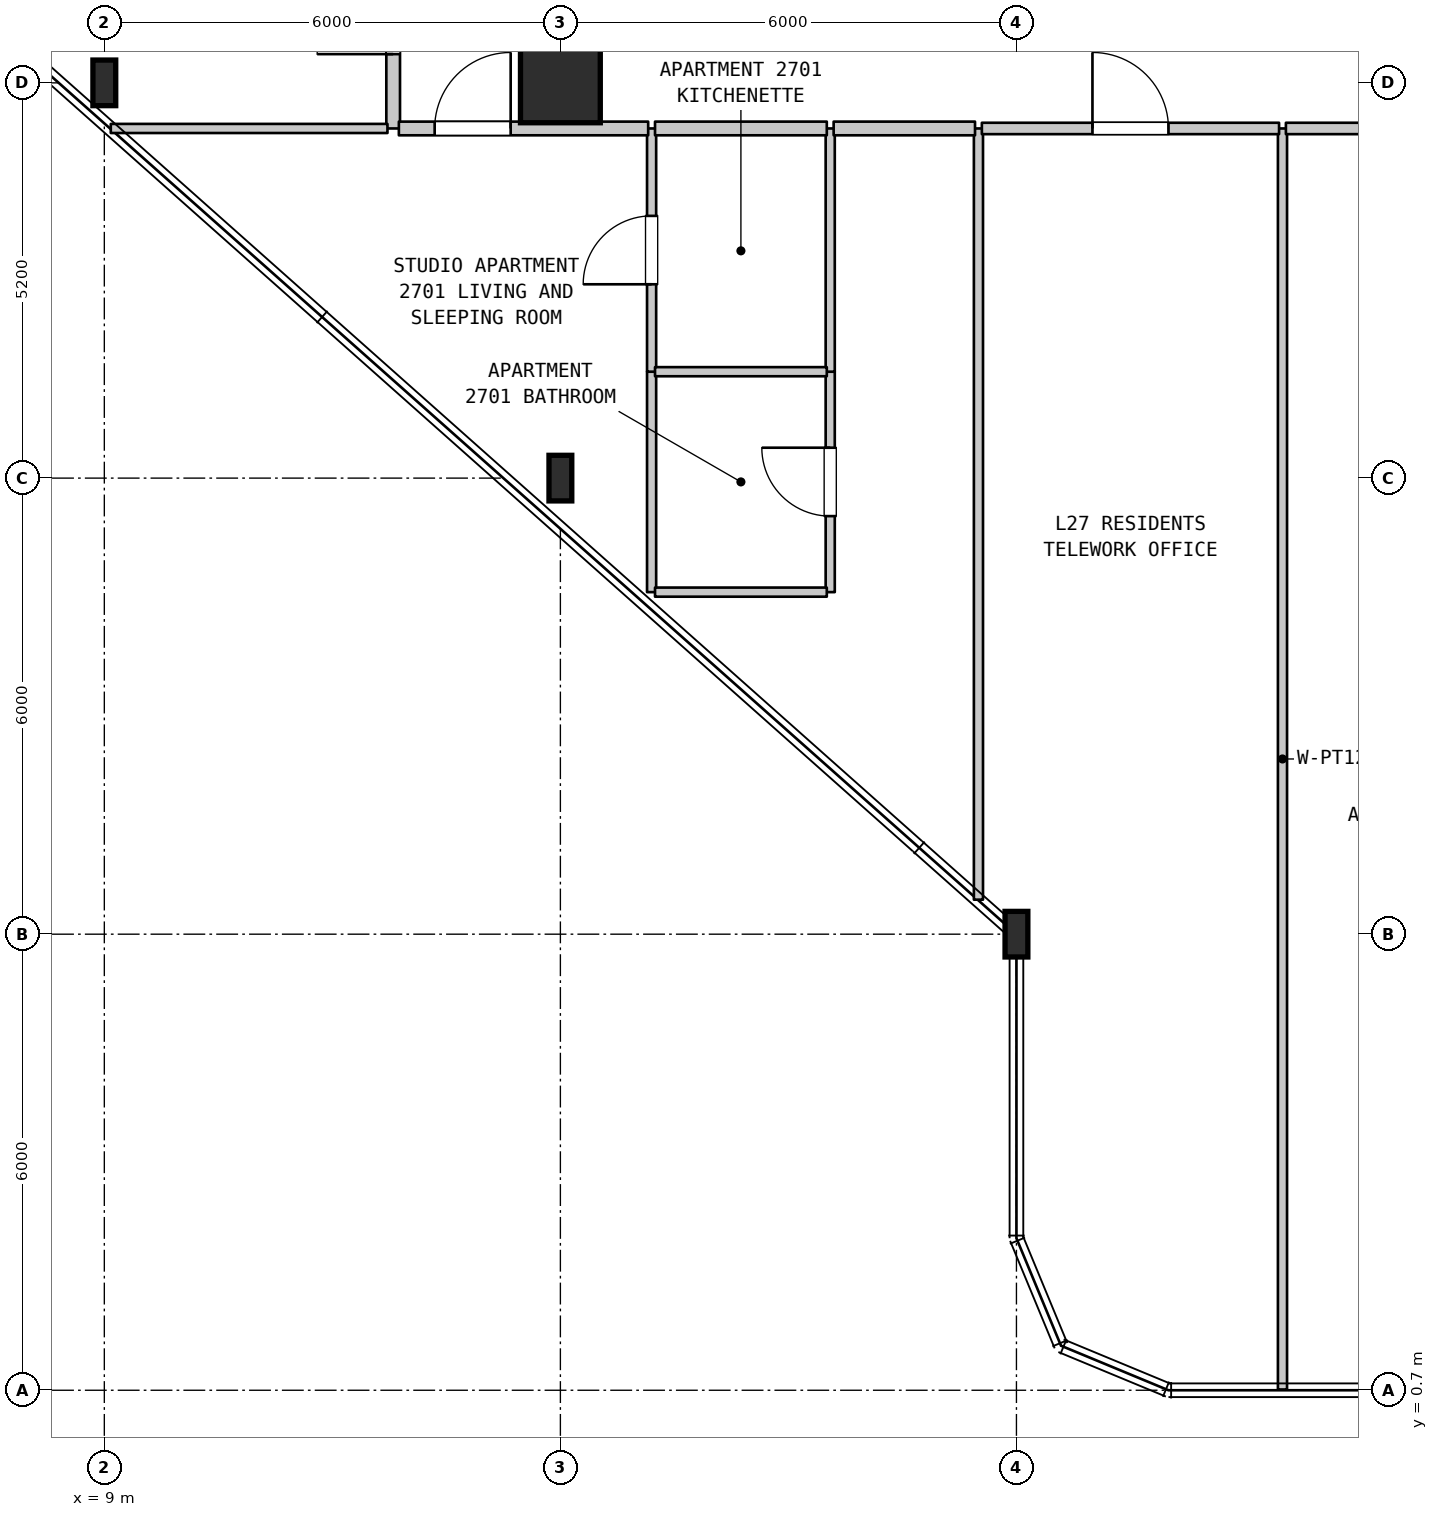
"""IFC4 building model, lengths in metres.
Left out: names, types, materials, properties, quantities, classifications, styles, units other than length and angle.
Written with IfcOpenShell. Run it as: python <this file> out.ifc"""

import sys

from ifc_helpers import new_model, si_unit, direction, frame, frame_2d, origin, origin_2d, place, context, subcontext, project, spatial, rectangle, i_section, extrude, element, fill, save


model = new_model("IFC4")
c1 = context("Model", 3, precision=1e-05, world=origin(), true_north=direction((0.0, 1.0)))
c2 = subcontext(c1, "Body", "Model", "MODEL_VIEW")
j1 = project(units=[si_unit("LENGTHUNIT", "METRE"), si_unit("PLANEANGLEUNIT", "RADIAN")], contexts=[c1])
p1 = place(None, origin())
s1 = spatial("IfcSite", under=j1, at=p1, CompositionType="ELEMENT")
p2 = place(p1, origin())
s2 = spatial("IfcBuilding", under=s1, at=p2, CompositionType="ELEMENT")
p3 = place(p2, frame((0.0, 0.0, 113.1)))
s3 = spatial("IfcBuildingStorey", under=s2, at=p3, CompositionType="ELEMENT", Elevation=113.1)
for number, where, z_axis, x_axis in (
    (1, (9.0, 17.9, 0.0), (0.0, 0.0, 1.0), (1.0, 0.0, 0.0)),
    (2, (15.0, 12.7, 0.0), (0.0, 0.0, 1.0), (1.0, 0.0, 0.0)),
):
    element("IfcColumn", number, at=place(p3, frame(where, z_axis=z_axis, x_axis=x_axis)), inside=s3, PredefinedType="COLUMN", context=c2, shape_type="SweptSolid", body=[
        extrude(i_section(OverallWidth=0.3, OverallDepth=0.6, WebThickness=0.015, FlangeThickness=0.03, FilletRadius=0.027, at=origin_2d()), origin(), (0.0, 0.0, 1.0), 3.7),
    ])
p4 = place(p3, frame((15.0, 17.9, 0.0), z_axis=(0.0, 0.0, 1.0), x_axis=(1.0, 0.0, 0.0)))
e3 = element("IfcColumn", 3, at=p4, inside=s3, PredefinedType="COLUMN", context=c2, shape_type="SweptSolid", body=[
    extrude(rectangle(XDim=1.05, YDim=1.05, at=origin_2d()), origin(), (0.0, 0.0, 1.0), 3.7),
])
p5 = place(p3, frame((21.0, 6.7, 0.0), z_axis=(0.0, 0.0, 1.0), x_axis=(1.0, 0.0, 0.0)))
e4 = element("IfcColumn", 4, at=p5, inside=s3, PredefinedType="COLUMN", context=c2, shape_type="SweptSolid", body=[
    extrude(i_section(OverallWidth=0.3, OverallDepth=0.6, WebThickness=0.015, FlangeThickness=0.03, FilletRadius=0.027, at=origin_2d()), origin(), (0.0, 0.0, 1.0), 3.7),
])
p6 = place(p3, frame((12.8, 17.3, 0.0), z_axis=(0.0, 0.0, 1.0), x_axis=(0.0, 1.0, 0.0)))
e5 = element("IfcWall", 5, at=p6, inside=s3, PredefinedType="STANDARD", context=c2, shape_type="SweptSolid", body=[
    extrude(rectangle(XDim=3.1, YDim=0.18, at=frame_2d((1.55, 0.0))), origin(), (0.0, 0.0, 1.0), 3.385),
])
p7 = place(p6, frame((0.978, 0.0, 0.0)))
e6 = element("IfcOpeningElement", 6, at=p7, cuts=e5, PredefinedType="OPENING", context=c2, shape_type="SweptSolid", body=[
    extrude(rectangle(XDim=1.0, YDim=2.15, at=frame_2d((0.5, 1.075))), frame((0.0, 0.1, 0.0), z_axis=(0.0, -1.0, 0.0), x_axis=(1.0, 0.0, 0.0)), (0.0, 0.0, 1.0), 0.2),
])
p8 = place(p3, frame((16.2, 11.2, 0.0), z_axis=(0.0, 0.0, 1.0), x_axis=(0.0, 1.0, 0.0)))
e7 = element("IfcWall", 7, at=p8, inside=s3, PredefinedType="PARTITIONING", context=c2, shape_type="SweptSolid", body=[
    extrude(rectangle(XDim=2.9, YDim=0.12, at=frame_2d((1.45, 0.0))), origin(), (0.0, 0.0, 1.0), 3.385),
])
p9 = place(p3, frame((16.2, 14.1, 0.0), z_axis=(0.0, 0.0, 1.0), x_axis=(0.0, 1.0, 0.0)))
e8 = element("IfcWall", 8, at=p9, inside=s3, PredefinedType="PARTITIONING", context=c2, shape_type="SweptSolid", body=[
    extrude(rectangle(XDim=3.2, YDim=0.12, at=frame_2d((1.6, 0.0))), origin(), (0.0, 0.0, 1.0), 3.385),
])
p10 = place(p9, frame((1.15, 0.0, 0.0)))
e9 = element("IfcOpeningElement", 9, at=p10, cuts=e8, PredefinedType="OPENING", context=c2, shape_type="SweptSolid", body=[
    extrude(rectangle(XDim=0.9, YDim=2.15, at=frame_2d((0.45, 1.075))), frame((0.0, 0.07, 0.0), z_axis=(0.0, -1.0, 0.0), x_axis=(1.0, 0.0, 0.0)), (0.0, 0.0, 1.0), 0.14),
])
p11 = place(p3, frame((18.55, 11.2, 0.0), z_axis=(0.0, 0.0, 1.0), x_axis=(0.0, 1.0, 0.0)))
e10 = element("IfcWall", 10, at=p11, inside=s3, PredefinedType="PARTITIONING", context=c2, shape_type="SweptSolid", body=[
    extrude(rectangle(XDim=2.9, YDim=0.12, at=frame_2d((1.45, 0.0))), origin(), (0.0, 0.0, 1.0), 3.385),
])
p12 = place(p11, frame((1.0, 0.0, 0.0)))
e11 = element("IfcOpeningElement", 11, at=p12, cuts=e10, PredefinedType="OPENING", context=c2, shape_type="SweptSolid", body=[
    extrude(rectangle(XDim=0.9, YDim=2.1, at=frame_2d((0.45, 1.05))), frame((0.0, 0.07, 0.0), z_axis=(0.0, -1.0, 0.0), x_axis=(1.0, 0.0, 0.0)), (0.0, 0.0, 1.0), 0.14),
])
p13 = place(p3, frame((18.55, 14.1, 0.0), z_axis=(0.0, 0.0, 1.0), x_axis=(0.0, 1.0, 0.0)))
e12 = element("IfcWall", 12, at=p13, inside=s3, PredefinedType="PARTITIONING", context=c2, shape_type="SweptSolid", body=[
    extrude(rectangle(XDim=3.2, YDim=0.12, at=frame_2d((1.6, 0.0))), origin(), (0.0, 0.0, 1.0), 3.385),
])
p14 = place(p3, frame((20.5, 7.154, 0.0), z_axis=(0.0, 0.0, 1.0), x_axis=(0.0, 1.0, 0.0)))
e13 = element("IfcWall", 13, at=p14, inside=s3, PredefinedType="PARTITIONING", context=c2, shape_type="SweptSolid", body=[
    extrude(rectangle(XDim=10.146, YDim=0.12, at=frame_2d((5.073, 0.0))), origin(), (0.0, 0.0, 1.0), 3.385),
])
p15 = place(p3, frame((24.5, 0.71, 0.0), z_axis=(0.0, 0.0, 1.0), x_axis=(0.0, 1.0, 0.0)))
e14 = element("IfcWall", 14, at=p15, inside=s3, PredefinedType="PARTITIONING", context=c2, shape_type="SweptSolid", body=[
    extrude(rectangle(XDim=16.59, YDim=0.12, at=frame_2d((8.295, 0.0))), origin(), (0.0, 0.0, 1.0), 3.385),
])
for number, where, z_axis, x_axis in (
    (15, (16.245, 11.2, 0.0), (0.0, 0.0, 1.0), (1.0, 0.0, 0.0)),
    (16, (16.245, 14.1, 0.0), (0.0, 0.0, 1.0), (1.0, 0.0, 0.0)),
):
    element("IfcWall", number, at=place(p3, frame(where, z_axis=z_axis, x_axis=x_axis)), inside=s3, PredefinedType="PARTITIONING", context=c2, shape_type="SweptSolid", body=[
        extrude(rectangle(XDim=2.26, YDim=0.12, at=frame_2d((1.13, 0.0))), origin(), (0.0, 0.0, 1.0), 3.385),
    ])
p16 = place(p3, frame((9.085, 17.3, 0.0), z_axis=(0.0, 0.0, 1.0), x_axis=(1.0, 0.0, 0.0)))
e17 = element("IfcWall", 17, at=p16, inside=s3, PredefinedType="PARTITIONING", context=c2, shape_type="SweptSolid", body=[
    extrude(rectangle(XDim=3.64, YDim=0.12, at=frame_2d((1.82, 0.0))), origin(), (0.0, 0.0, 1.0), 3.385),
])
p17 = place(p3, frame((12.875, 17.3, 0.0), z_axis=(0.0, 0.0, 1.0), x_axis=(1.0, 0.0, 0.0)))
e18 = element("IfcWall", 18, at=p17, inside=s3, PredefinedType="STANDARD", context=c2, shape_type="SweptSolid", body=[
    extrude(rectangle(XDim=3.28, YDim=0.18, at=frame_2d((1.64, 0.0))), origin(), (0.0, 0.0, 1.0), 3.385),
])
p18 = place(p17, frame((0.471, 0.0, 0.0)))
e19 = element("IfcOpeningElement", 19, at=p18, cuts=e18, PredefinedType="OPENING", context=c2, shape_type="SweptSolid", body=[
    extrude(rectangle(XDim=1.0, YDim=2.15, at=frame_2d((0.5, 1.075))), frame((0.0, 0.1, 0.0), z_axis=(0.0, -1.0, 0.0), x_axis=(1.0, 0.0, 0.0)), (0.0, 0.0, 1.0), 0.2),
])
p19 = place(p3, frame((16.245, 17.3, 0.0), z_axis=(0.0, 0.0, 1.0), x_axis=(1.0, 0.0, 0.0)))
e20 = element("IfcWall", 20, at=p19, inside=s3, PredefinedType="STANDARD", context=c2, shape_type="SweptSolid", body=[
    extrude(rectangle(XDim=2.26, YDim=0.18, at=frame_2d((1.13, 0.0))), origin(), (0.0, 0.0, 1.0), 3.385),
])
p20 = place(p3, frame((18.595, 17.3, 0.0), z_axis=(0.0, 0.0, 1.0), x_axis=(1.0, 0.0, 0.0)))
e21 = element("IfcWall", 21, at=p20, inside=s3, PredefinedType="STANDARD", context=c2, shape_type="SweptSolid", body=[
    extrude(rectangle(XDim=1.86, YDim=0.18, at=frame_2d((0.93, 0.0))), origin(), (0.0, 0.0, 1.0), 3.385),
])
p21 = place(p3, frame((20.545, 17.3, 0.0), z_axis=(0.0, 0.0, 1.0), x_axis=(1.0, 0.0, 0.0)))
e22 = element("IfcWall", 22, at=p21, inside=s3, PredefinedType="STANDARD", context=c2, shape_type="SweptSolid", body=[
    extrude(rectangle(XDim=3.91, YDim=0.15, at=frame_2d((1.955, 0.0))), origin(), (0.0, 0.0, 1.0), 3.385),
])
p22 = place(p21, frame((1.455, 0.0, 0.0)))
e23 = element("IfcOpeningElement", 23, at=p22, cuts=e22, PredefinedType="OPENING", context=c2, shape_type="SweptSolid", body=[
    extrude(rectangle(XDim=1.0, YDim=2.15, at=frame_2d((0.5, 1.075))), frame((0.0, 0.085, 0.0), z_axis=(0.0, -1.0, 0.0), x_axis=(1.0, 0.0, 0.0)), (0.0, 0.0, 1.0), 0.17),
])
p23 = place(p3, frame((24.545, 17.3, 0.0), z_axis=(0.0, 0.0, 1.0), x_axis=(1.0, 0.0, 0.0)))
e24 = element("IfcWall", 24, at=p23, inside=s3, PredefinedType="STANDARD", context=c2, shape_type="SweptSolid", body=[
    extrude(rectangle(XDim=4.21, YDim=0.15, at=frame_2d((2.105, 0.0))), origin(), (0.0, 0.0, 1.0), 3.385),
])
p24 = place(p23, frame((1.605, 0.0, 0.0)))
e25 = element("IfcOpeningElement", 25, at=p24, cuts=e24, PredefinedType="OPENING", context=c2, shape_type="SweptSolid", body=[
    extrude(rectangle(XDim=1.0, YDim=2.15, at=frame_2d((0.5, 1.075))), frame((0.0, 0.085, 0.0), z_axis=(0.0, -1.0, 0.0), x_axis=(1.0, 0.0, 0.0)), (0.0, 0.0, 1.0), 0.17),
])
p25 = place(p7, origin())
e26 = element("IfcDoor", 26, at=p25, inside=s3, OperationType="SINGLE_SWING_LEFT", PredefinedType="DOOR", context=c2, shape_type="SweptSolid", body=[
    extrude(rectangle(XDim=1.0, YDim=2.15, at=frame_2d((0.5, 1.075))), frame((0.0, 0.025, 0.0), z_axis=(0.0, -1.0, 0.0), x_axis=(1.0, 0.0, 0.0)), (0.0, 0.0, 1.0), 0.05),
])
fill(e6, e26)
p26 = place(p10, origin())
e27 = element("IfcDoor", 27, at=p26, inside=s3, OperationType="SINGLE_SWING_LEFT", PredefinedType="DOOR", context=c2, shape_type="SweptSolid", body=[
    extrude(rectangle(XDim=0.9, YDim=2.15, at=frame_2d((0.45, 1.075))), frame((0.0, 0.025, 0.0), z_axis=(0.0, -1.0, 0.0), x_axis=(1.0, 0.0, 0.0)), (0.0, 0.0, 1.0), 0.05),
])
fill(e9, e27)
p27 = place(p12, origin())
e28 = element("IfcDoor", 28, at=p27, inside=s3, OperationType="SINGLE_SWING_RIGHT", PredefinedType="DOOR", context=c2, shape_type="SweptSolid", body=[
    extrude(rectangle(XDim=0.9, YDim=2.1, at=frame_2d((0.45, 1.05))), frame((0.0, 0.025, 0.0), z_axis=(0.0, -1.0, 0.0), x_axis=(1.0, 0.0, 0.0)), (0.0, 0.0, 1.0), 0.05),
])
fill(e11, e28)
p28 = place(p18, origin())
e29 = element("IfcDoor", 29, at=p28, inside=s3, OperationType="SINGLE_SWING_RIGHT", PredefinedType="DOOR", context=c2, shape_type="SweptSolid", body=[
    extrude(rectangle(XDim=1.0, YDim=2.15, at=frame_2d((0.5, 1.075))), frame((0.0, 0.025, 0.0), z_axis=(0.0, -1.0, 0.0), x_axis=(1.0, 0.0, 0.0)), (0.0, 0.0, 1.0), 0.05),
])
fill(e19, e29)
p29 = place(p22, origin())
e30 = element("IfcDoor", 30, at=p29, inside=s3, OperationType="SINGLE_SWING_LEFT", PredefinedType="DOOR", context=c2, shape_type="SweptSolid", body=[
    extrude(rectangle(XDim=1.0, YDim=2.15, at=frame_2d((0.5, 1.075))), frame((0.0, 0.025, 0.0), z_axis=(0.0, -1.0, 0.0), x_axis=(1.0, 0.0, 0.0)), (0.0, 0.0, 1.0), 0.05),
])
fill(e23, e30)
save(model, sys.argv[1])
